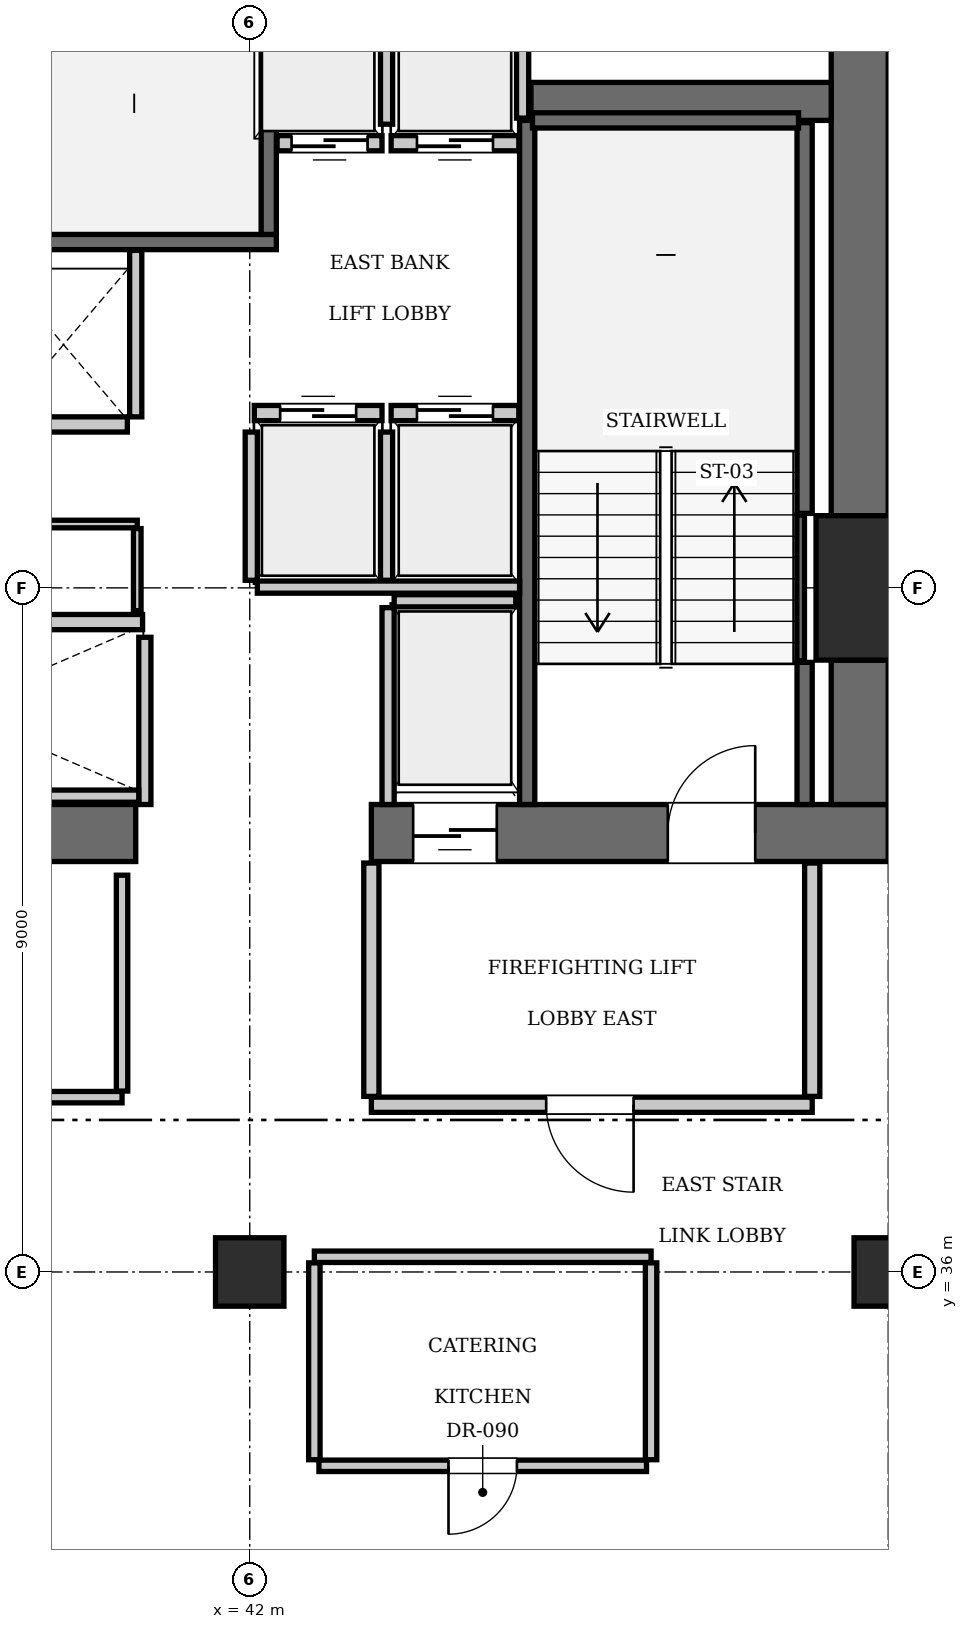
"""IFC4 building model, lengths in metres.
Left out: names, types, materials, properties, quantities, classifications, styles, units other than length and angle.
Written with IfcOpenShell. Run it as: python <this file> out.ifc"""

import sys

from ifc_helpers import new_model, si_unit, direction, frame, frame_2d, origin, origin_2d, place, context, subcontext, project, spatial, rectangle, extrude, element, fill, save


model = new_model("IFC4")
c1 = context("Model", 3, precision=1e-05, world=origin(), true_north=direction((0.0, 1.0)))
c2 = subcontext(c1, "Body", "Model", "MODEL_VIEW")
j1 = project(units=[si_unit("LENGTHUNIT", "METRE"), si_unit("PLANEANGLEUNIT", "RADIAN")], contexts=[c1])
p1 = place(None, origin())
s1 = spatial("IfcSite", under=j1, at=p1, CompositionType="ELEMENT")
p2 = place(p1, origin())
s2 = spatial("IfcBuilding", under=s1, at=p2, CompositionType="ELEMENT")
p3 = place(p2, frame((0.0, 0.0, 208.25)))
s3 = spatial("IfcBuildingStorey", under=s2, at=p3, CompositionType="ELEMENT", Elevation=208.25)
p4 = place(p3, frame((50.4, 45.0, 0.0), z_axis=(0.0, 0.0, 1.0), x_axis=(1.0, 0.0, 0.0)))
e1 = element("IfcColumn", 1, at=p4, inside=s3, PredefinedType="COLUMN", context=c2, shape_type="SweptSolid", body=[
    extrude(rectangle(XDim=1.9, YDim=1.9, at=origin_2d()), origin(), (0.0, 0.0, 1.0), 3.85),
])
p5 = place(p3, frame((35.1, 41.775, 0.0), z_axis=(0.0, 0.0, 1.0), x_axis=(1.0, 0.0, 0.0)))
e2 = element("IfcWall", 2, at=p5, inside=s3, PredefinedType="SHEAR", context=c2, shape_type="SweptSolid", body=[
    extrude(rectangle(XDim=5.4, YDim=0.75, at=frame_2d((2.7, 0.0))), origin(), (0.0, 0.0, 1.0), 3.85),
])
p6 = place(p3, frame((43.6, 41.775, 0.0), z_axis=(0.0, 0.0, 1.0), x_axis=(1.0, 0.0, 0.0)))
e3 = element("IfcWall", 3, at=p6, inside=s3, PredefinedType="SHEAR", context=c2, shape_type="SweptSolid", body=[
    extrude(rectangle(XDim=6.8, YDim=0.75, at=frame_2d((3.4, 0.0))), origin(), (0.0, 0.0, 1.0), 3.85),
])
p7 = place(p6, frame((3.9, 0.0, 0.0)))
e4 = element("IfcOpeningElement", 4, at=p7, cuts=e3, PredefinedType="OPENING", context=c2, shape_type="SweptSolid", body=[
    extrude(rectangle(XDim=1.15, YDim=2.15, at=frame_2d((0.575, 1.075))), frame((0.0, 0.385, 0.0), z_axis=(0.0, -1.0, 0.0), x_axis=(1.0, 0.0, 0.0)), (0.0, 0.0, 1.0), 0.77),
])
p8 = place(p6, frame((0.55, 0.0, 0.0)))
e5 = element("IfcOpeningElement", 5, at=p8, cuts=e3, PredefinedType="OPENING", context=c2, shape_type="SweptSolid", body=[
    extrude(rectangle(XDim=1.1, YDim=2.2, at=frame_2d((0.55, 1.1))), frame((0.0, 0.385, 0.0), z_axis=(0.0, -1.0, 0.0), x_axis=(1.0, 0.0, 0.0)), (0.0, 0.0, 1.0), 0.77),
])
p9 = place(p3, frame((50.025, 42.15, 0.0), z_axis=(0.0, 0.0, 1.0), x_axis=(0.0, 1.0, 0.0)))
e6 = element("IfcWall", 6, at=p9, inside=s3, PredefinedType="SHEAR", context=c2, shape_type="SweptSolid", body=[
    extrude(rectangle(XDim=1.9, YDim=0.75, at=frame_2d((0.95, 0.0))), origin(), (0.0, 0.0, 1.0), 3.85),
])
p10 = place(p3, frame((50.025, 45.95, 0.0), z_axis=(0.0, 0.0, 1.0), x_axis=(0.0, 1.0, 0.0)))
e7 = element("IfcWall", 7, at=p10, inside=s3, PredefinedType="SHEAR", context=c2, shape_type="SweptSolid", body=[
    extrude(rectangle(XDim=7.3, YDim=0.75, at=frame_2d((3.65, 0.0))), origin(), (0.0, 0.0, 1.0), 3.85),
])
p11 = place(p3, frame((45.7, 51.4, 0.0), z_axis=(0.0, 0.0, 1.0), x_axis=(1.0, 0.0, 0.0)))
e8 = element("IfcWall", 8, at=p11, inside=s3, PredefinedType="SHEAR", context=c2, shape_type="SweptSolid", body=[
    extrude(rectangle(XDim=3.95, YDim=0.5, at=frame_2d((1.975, 0.0))), origin(), (0.0, 0.0, 1.0), 3.85),
])
for number, where, z_axis, x_axis in (
    (9, (42.0, 36.0, 0.0), (0.0, 0.0, 1.0), (1.0, 0.0, 0.0)),
    (10, (50.4, 36.0, 0.0), (0.0, 0.0, 1.0), (1.0, 0.0, 0.0)),
):
    element("IfcColumn", number, at=place(p3, frame(where, z_axis=z_axis, x_axis=x_axis)), inside=s3, PredefinedType="COLUMN", context=c2, shape_type="SweptSolid", body=[
        extrude(rectangle(XDim=0.9, YDim=0.9, at=origin_2d()), origin(), (0.0, 0.0, 1.0), 3.85),
    ])
p12 = place(p3, frame((33.25, 49.55, 0.0), z_axis=(0.0, 0.0, 1.0), x_axis=(1.0, 0.0, 0.0)))
e11 = element("IfcWall", 11, at=p12, inside=s3, PredefinedType="SOLIDWALL", context=c2, shape_type="SweptSolid", body=[
    extrude(rectangle(XDim=9.1, YDim=0.2, at=frame_2d((4.55, 0.0))), origin(), (0.0, 0.0, 1.0), 3.61),
])
p13 = place(p3, frame((42.25, 49.65, 0.0), z_axis=(0.0, 0.0, 1.0), x_axis=(0.0, 1.0, 0.0)))
e12 = element("IfcWall", 12, at=p13, inside=s3, PredefinedType="SOLIDWALL", context=c2, shape_type="SweptSolid", body=[
    extrude(rectangle(XDim=3.6, YDim=0.2, at=frame_2d((1.8, 0.0))), origin(), (0.0, 0.0, 1.0), 3.61),
])
p14 = place(p3, frame((45.65, 42.15, 0.0), z_axis=(0.0, 0.0, 1.0), x_axis=(0.0, 1.0, 0.0)))
e13 = element("IfcWall", 13, at=p14, inside=s3, PredefinedType="SOLIDWALL", context=c2, shape_type="SweptSolid", body=[
    extrude(rectangle(XDim=9.0, YDim=0.2, at=frame_2d((4.5, 0.0))), origin(), (0.0, 0.0, 1.0), 3.61),
])
p15 = place(p3, frame((49.3, 42.15, 0.0), z_axis=(0.0, 0.0, 1.0), x_axis=(0.0, 1.0, 0.0)))
e14 = element("IfcWall", 14, at=p15, inside=s3, PredefinedType="SOLIDWALL", context=c2, shape_type="SweptSolid", body=[
    extrude(rectangle(XDim=1.87, YDim=0.2, at=frame_2d((0.935, 0.0))), origin(), (0.0, 0.0, 1.0), 3.61),
])
p16 = place(p3, frame((49.3, 45.98, 0.0), z_axis=(0.0, 0.0, 1.0), x_axis=(0.0, 1.0, 0.0)))
e15 = element("IfcWall", 15, at=p16, inside=s3, PredefinedType="SOLIDWALL", context=c2, shape_type="SweptSolid", body=[
    extrude(rectangle(XDim=5.14, YDim=0.2, at=frame_2d((2.57, 0.0))), origin(), (0.0, 0.0, 1.0), 3.61),
])
p17 = place(p3, frame((45.72, 51.15, 0.0), z_axis=(0.0, 0.0, 1.0), x_axis=(1.0, 0.0, 0.0)))
e16 = element("IfcWall", 16, at=p17, inside=s3, PredefinedType="SOLIDWALL", context=c2, shape_type="SweptSolid", body=[
    extrude(rectangle(XDim=3.5, YDim=0.2, at=frame_2d((1.75, 0.0))), origin(), (0.0, 0.0, 1.0), 3.61),
])
p18 = place(p3, frame((49.248, 44.04, 0.0), z_axis=(0.0, 0.0, 1.0), x_axis=(0.0, 1.0, 0.0)))
e17 = element("IfcWall", 17, at=p18, inside=s3, PredefinedType="SOLIDWALL", context=c2, shape_type="SweptSolid", body=[
    extrude(rectangle(XDim=1.92, YDim=0.1, at=frame_2d((0.96, 0.0))), origin(), (0.0, 0.0, 1.0), 3.61),
])
p19 = place(p3, frame((42.06, 47.3, 0.0), z_axis=(0.0, 0.0, 1.0), x_axis=(1.0, 0.0, 0.0)))
e18 = element("IfcWall", 18, at=p19, inside=s3, PredefinedType="SOLIDWALL", context=c2, shape_type="SweptSolid", body=[
    extrude(rectangle(XDim=1.68, YDim=0.2, at=frame_2d((0.84, 0.0))), origin(), (0.0, 0.0, 1.0), 3.61),
])
p20 = place(p19, frame((0.34, 0.0, 0.0)))
e19 = element("IfcOpeningElement", 19, at=p20, cuts=e18, PredefinedType="OPENING", context=c2, shape_type="SweptSolid", body=[
    extrude(rectangle(XDim=1.0, YDim=2.15, at=frame_2d((0.5, 1.075))), frame((0.0, 0.11, 0.0), z_axis=(0.0, -1.0, 0.0), x_axis=(1.0, 0.0, 0.0)), (0.0, 0.0, 1.0), 0.22),
])
p21 = place(p3, frame((43.86, 47.3, 0.0), z_axis=(0.0, 0.0, 1.0), x_axis=(1.0, 0.0, 0.0)))
e20 = element("IfcWall", 20, at=p21, inside=s3, PredefinedType="SOLIDWALL", context=c2, shape_type="SweptSolid", body=[
    extrude(rectangle(XDim=1.68, YDim=0.2, at=frame_2d((0.84, 0.0))), origin(), (0.0, 0.0, 1.0), 3.61),
])
p22 = place(p21, frame((0.34, 0.0, 0.0)))
e21 = element("IfcOpeningElement", 21, at=p22, cuts=e20, PredefinedType="OPENING", context=c2, shape_type="SweptSolid", body=[
    extrude(rectangle(XDim=1.0, YDim=2.15, at=frame_2d((0.5, 1.075))), frame((0.0, 0.11, 0.0), z_axis=(0.0, -1.0, 0.0), x_axis=(1.0, 0.0, 0.0)), (0.0, 0.0, 1.0), 0.22),
])
p23 = place(p3, frame((42.36, 50.85, 0.0), z_axis=(0.0, 0.0, 1.0), x_axis=(1.0, 0.0, 0.0)))
e22 = element("IfcWall", 22, at=p23, inside=s3, PredefinedType="SOLIDWALL", context=c2, shape_type="SweptSolid", body=[
    extrude(rectangle(XDim=1.38, YDim=0.2, at=frame_2d((0.69, 0.0))), origin(), (0.0, 0.0, 1.0), 3.61),
])
p24 = place(p23, frame((0.19, 0.0, 0.0)))
e23 = element("IfcOpeningElement", 23, at=p24, cuts=e22, PredefinedType="OPENING", context=c2, shape_type="SweptSolid", body=[
    extrude(rectangle(XDim=1.0, YDim=2.15, at=frame_2d((0.5, 1.075))), frame((0.0, 0.11, 0.0), z_axis=(0.0, -1.0, 0.0), x_axis=(1.0, 0.0, 0.0)), (0.0, 0.0, 1.0), 0.22),
])
p25 = place(p3, frame((43.86, 50.85, 0.0), z_axis=(0.0, 0.0, 1.0), x_axis=(1.0, 0.0, 0.0)))
e24 = element("IfcWall", 24, at=p25, inside=s3, PredefinedType="SOLIDWALL", context=c2, shape_type="SweptSolid", body=[
    extrude(rectangle(XDim=1.68, YDim=0.2, at=frame_2d((0.84, 0.0))), origin(), (0.0, 0.0, 1.0), 3.61),
])
p26 = place(p25, frame((0.34, 0.0, 0.0)))
e25 = element("IfcOpeningElement", 25, at=p26, cuts=e24, PredefinedType="OPENING", context=c2, shape_type="SweptSolid", body=[
    extrude(rectangle(XDim=1.0, YDim=2.15, at=frame_2d((0.5, 1.075))), frame((0.0, 0.11, 0.0), z_axis=(0.0, -1.0, 0.0), x_axis=(1.0, 0.0, 0.0)), (0.0, 0.0, 1.0), 0.22),
])
p27 = place(p3, frame((38.91, 44.55, 0.0), z_axis=(0.0, 0.0, 1.0), x_axis=(1.0, 0.0, 0.0)))
e26 = element("IfcWall", 26, at=p27, inside=s3, PredefinedType="SOLIDWALL", context=c2, shape_type="SweptSolid", body=[
    extrude(rectangle(XDim=1.68, YDim=0.2, at=frame_2d((0.84, 0.0))), origin(), (0.0, 0.0, 1.0), 3.61),
])
p28 = place(p3, frame((38.71, 47.15, 0.0), z_axis=(0.0, 0.0, 1.0), x_axis=(1.0, 0.0, 0.0)))
e27 = element("IfcWall", 27, at=p28, inside=s3, PredefinedType="SOLIDWALL", context=c2, shape_type="SweptSolid", body=[
    extrude(rectangle(XDim=1.68, YDim=0.2, at=frame_2d((0.84, 0.0))), origin(), (0.0, 0.0, 1.0), 3.61),
])
p29 = place(p3, frame((43.9, 44.83, 0.0), z_axis=(0.0, 0.0, 1.0), x_axis=(1.0, 0.0, 0.0)))
e28 = element("IfcWall", 28, at=p29, inside=s3, PredefinedType="SOLIDWALL", context=c2, shape_type="SweptSolid", body=[
    extrude(rectangle(XDim=1.6, YDim=0.16, at=frame_2d((0.8, 0.0))), origin(), (0.0, 0.0, 1.0), 3.61),
])
p30 = place(p3, frame((43.82, 42.15, 0.0), z_axis=(0.0, 0.0, 1.0), x_axis=(0.0, 1.0, 0.0)))
e29 = element("IfcWall", 29, at=p30, inside=s3, PredefinedType="SOLIDWALL", context=c2, shape_type="SweptSolid", body=[
    extrude(rectangle(XDim=2.59, YDim=0.16, at=frame_2d((1.295, 0.0))), origin(), (0.0, 0.0, 1.0), 3.61),
])
for number, where, z_axis, x_axis in (
    (30, (42.02, 45.1, 0.0), (0.0, 0.0, 1.0), (0.0, 1.0, 0.0)),
    (31, (43.8, 45.1, 0.0), (0.0, 0.0, 1.0), (0.0, 1.0, 0.0)),
):
    element("IfcWall", number, at=place(p3, frame(where, z_axis=z_axis, x_axis=x_axis)), inside=s3, PredefinedType="SOLIDWALL", context=c2, shape_type="SweptSolid", body=[
        extrude(rectangle(XDim=1.95, YDim=0.16, at=frame_2d((0.975, 0.0))), origin(), (0.0, 0.0, 1.0), 3.61),
    ])
p31 = place(p3, frame((42.1, 45.01, 0.0), z_axis=(0.0, 0.0, 1.0), x_axis=(1.0, 0.0, 0.0)))
e32 = element("IfcWall", 32, at=p31, inside=s3, PredefinedType="SOLIDWALL", context=c2, shape_type="SweptSolid", body=[
    extrude(rectangle(XDim=3.45, YDim=0.16, at=frame_2d((1.725, 0.0))), origin(), (0.0, 0.0, 1.0), 3.61),
])
p32 = place(p3, frame((45.59, 51.18, 0.0), z_axis=(0.0, 0.0, 1.0), x_axis=(0.0, 1.0, 0.0)))
e33 = element("IfcWall", 33, at=p32, inside=s3, PredefinedType="SOLIDWALL", context=c2, shape_type="SweptSolid", body=[
    extrude(rectangle(XDim=2.07, YDim=0.16, at=frame_2d((1.035, 0.0))), origin(), (0.0, 0.0, 1.0), 3.61),
])
p33 = place(p3, frame((43.8, 51.1, 0.0), z_axis=(0.0, 0.0, 1.0), x_axis=(0.0, 1.0, 0.0)))
e34 = element("IfcWall", 34, at=p33, inside=s3, PredefinedType="SOLIDWALL", context=c2, shape_type="SweptSolid", body=[
    extrude(rectangle(XDim=2.15, YDim=0.16, at=frame_2d((1.075, 0.0))), origin(), (0.0, 0.0, 1.0), 3.61),
])
p34 = place(p3, frame((40.62, 42.15, 0.0), z_axis=(0.0, 0.0, 1.0), x_axis=(0.0, 1.0, 0.0)))
e35 = element("IfcWall", 35, at=p34, inside=s3, PredefinedType="SOLIDWALL", context=c2, shape_type="SweptSolid", body=[
    extrude(rectangle(XDim=2.2, YDim=0.16, at=frame_2d((1.1, 0.0))), origin(), (0.0, 0.0, 1.0), 3.61),
])
p35 = place(p3, frame((35.52, 42.26, 0.0), z_axis=(0.0, 0.0, 1.0), x_axis=(1.0, 0.0, 0.0)))
e36 = element("IfcWall", 36, at=p35, inside=s3, PredefinedType="SOLIDWALL", context=c2, shape_type="SweptSolid", body=[
    extrude(rectangle(XDim=5.02, YDim=0.16, at=frame_2d((2.51, 0.0))), origin(), (0.0, 0.0, 1.0), 3.61),
])
p36 = place(p3, frame((40.5, 47.25, 0.0), z_axis=(0.0, 0.0, 1.0), x_axis=(0.0, 1.0, 0.0)))
e37 = element("IfcWall", 37, at=p36, inside=s3, PredefinedType="SOLIDWALL", context=c2, shape_type="SweptSolid", body=[
    extrude(rectangle(XDim=2.19, YDim=0.16, at=frame_2d((1.095, 0.0))), origin(), (0.0, 0.0, 1.0), 3.61),
])
p37 = place(p3, frame((43.6, 38.2, 0.0), z_axis=(0.0, 0.0, 1.0), x_axis=(1.0, 0.0, 0.0)))
e38 = element("IfcWall", 38, at=p37, inside=s3, PredefinedType="PARTITIONING", context=c2, shape_type="SweptSolid", body=[
    extrude(rectangle(XDim=5.8, YDim=0.2, at=frame_2d((2.9, 0.0))), origin(), (0.0, 0.0, 1.0), 3.61),
])
p38 = place(p37, frame((2.3, 0.0, 0.0)))
e39 = element("IfcOpeningElement", 39, at=p38, cuts=e38, PredefinedType="OPENING", context=c2, shape_type="SweptSolid", body=[
    extrude(rectangle(XDim=1.15, YDim=2.15, at=frame_2d((0.575, 1.075))), frame((0.0, 0.11, 0.0), z_axis=(0.0, -1.0, 0.0), x_axis=(1.0, 0.0, 0.0)), (0.0, 0.0, 1.0), 0.22),
])
for number, where, z_axis, x_axis in (
    (40, (43.6, 38.31, 0.0), (0.0, 0.0, 1.0), (0.0, 1.0, 0.0)),
    (41, (49.4, 38.31, 0.0), (0.0, 0.0, 1.0), (0.0, 1.0, 0.0)),
):
    element("IfcWall", number, at=place(p3, frame(where, z_axis=z_axis, x_axis=x_axis)), inside=s3, PredefinedType="PARTITIONING", context=c2, shape_type="SweptSolid", body=[
        extrude(rectangle(XDim=3.07, YDim=0.2, at=frame_2d((1.535, 0.0))), origin(), (0.0, 0.0, 1.0), 3.61),
    ])
p39 = place(p3, frame((35.58, 45.84, 0.0), z_axis=(0.0, 0.0, 1.0), x_axis=(1.0, 0.0, 0.0)))
e42 = element("IfcWall", 42, at=p39, inside=s3, PredefinedType="PARTITIONING", context=c2, shape_type="SweptSolid", body=[
    extrude(rectangle(XDim=4.94, YDim=0.1, at=frame_2d((2.47, 0.0))), origin(), (0.0, 0.0, 1.0), 3.61),
])
p40 = place(p39, frame((1.8, 0.0, 0.0)))
e43 = element("IfcOpeningElement", 43, at=p40, cuts=e42, PredefinedType="OPENING", context=c2, shape_type="SweptSolid", body=[
    extrude(rectangle(XDim=0.8, YDim=2.05, at=frame_2d((0.4, 1.025))), frame((0.0, 0.06, 0.0), z_axis=(0.0, -1.0, 0.0), x_axis=(1.0, 0.0, 0.0)), (0.0, 0.0, 1.0), 0.12),
])
p41 = place(p3, frame((40.52, 44.7, 0.0), z_axis=(0.0, 0.0, 1.0), x_axis=(0.0, 1.0, 0.0)))
e44 = element("IfcWall", 44, at=p41, inside=s3, PredefinedType="PARTITIONING", context=c2, shape_type="SweptSolid", body=[
    extrude(rectangle(XDim=1.08, YDim=0.1, at=frame_2d((0.54, 0.0))), origin(), (0.0, 0.0, 1.0), 3.61),
])
p42 = place(p3, frame((34.4, 38.3, 0.0), z_axis=(0.0, 0.0, 1.0), x_axis=(1.0, 0.0, 0.0)))
e45 = element("IfcWall", 45, at=p42, inside=s3, PredefinedType="PARTITIONING", context=c2, shape_type="SweptSolid", body=[
    extrude(rectangle(XDim=5.92, YDim=0.15, at=frame_2d((2.96, 0.0))), origin(), (0.0, 0.0, 1.0), 3.61),
])
p43 = place(p42, frame((2.4, 0.0, 0.0)))
e46 = element("IfcOpeningElement", 46, at=p43, cuts=e45, PredefinedType="OPENING", context=c2, shape_type="SweptSolid", body=[
    extrude(rectangle(XDim=0.9, YDim=2.1, at=frame_2d((0.45, 1.05))), frame((0.0, 0.085, 0.0), z_axis=(0.0, -1.0, 0.0), x_axis=(1.0, 0.0, 0.0)), (0.0, 0.0, 1.0), 0.17),
])
p44 = place(p3, frame((40.32, 38.38, 0.0), z_axis=(0.0, 0.0, 1.0), x_axis=(0.0, 1.0, 0.0)))
e47 = element("IfcWall", 47, at=p44, inside=s3, PredefinedType="PARTITIONING", context=c2, shape_type="SweptSolid", body=[
    extrude(rectangle(XDim=2.84, YDim=0.15, at=frame_2d((1.42, 0.0))), origin(), (0.0, 0.0, 1.0), 3.61),
])
p45 = place(p3, frame((42.85, 36.2, 0.0), z_axis=(0.0, 0.0, 1.0), x_axis=(1.0, 0.0, 0.0)))
e48 = element("IfcWall", 48, at=p45, inside=s3, PredefinedType="PARTITIONING", context=c2, shape_type="SweptSolid", body=[
    extrude(rectangle(XDim=4.43, YDim=0.15, at=frame_2d((2.215, 0.0))), origin(), (0.0, 0.0, 1.0), 3.61),
])
for number, where, z_axis, x_axis in (
    (49, (42.85, 33.53, 0.0), (0.0, 0.0, 1.0), (0.0, 1.0, 0.0)),
    (50, (47.28, 33.53, 0.0), (0.0, 0.0, 1.0), (0.0, 1.0, 0.0)),
):
    element("IfcWall", number, at=place(p3, frame(where, z_axis=z_axis, x_axis=x_axis)), inside=s3, PredefinedType="PARTITIONING", context=c2, shape_type="SweptSolid", body=[
        extrude(rectangle(XDim=2.59, YDim=0.15, at=frame_2d((1.295, 0.0))), origin(), (0.0, 0.0, 1.0), 3.61),
    ])
p46 = place(p3, frame((42.91, 33.45, 0.0), z_axis=(0.0, 0.0, 1.0), x_axis=(1.0, 0.0, 0.0)))
e51 = element("IfcWall", 51, at=p46, inside=s3, PredefinedType="PARTITIONING", context=c2, shape_type="SweptSolid", body=[
    extrude(rectangle(XDim=4.31, YDim=0.15, at=frame_2d((2.155, 0.0))), origin(), (0.0, 0.0, 1.0), 3.61),
])
p47 = place(p46, frame((1.705, 0.0, 0.0)))
e52 = element("IfcOpeningElement", 52, at=p47, cuts=e51, PredefinedType="OPENING", context=c2, shape_type="SweptSolid", body=[
    extrude(rectangle(XDim=0.9, YDim=2.1, at=frame_2d((0.45, 1.05))), frame((0.0, 0.085, 0.0), z_axis=(0.0, -1.0, 0.0), x_axis=(1.0, 0.0, 0.0)), (0.0, 0.0, 1.0), 0.17),
])
p48 = place(p7, origin())
e53 = element("IfcDoor", 53, at=p48, inside=s3, OperationType="SINGLE_SWING_RIGHT", PredefinedType="DOOR", context=c2, shape_type="SweptSolid", body=[
    extrude(rectangle(XDim=1.15, YDim=2.15, at=frame_2d((0.575, 1.075))), frame((0.0, 0.025, 0.0), z_axis=(0.0, -1.0, 0.0), x_axis=(1.0, 0.0, 0.0)), (0.0, 0.0, 1.0), 0.05),
])
fill(e4, e53)
p49 = place(p20, origin())
e54 = element("IfcDoor", 54, at=p49, inside=s3, OperationType="SLIDING_TO_LEFT", PredefinedType="DOOR", context=c2, shape_type="SweptSolid", body=[
    extrude(rectangle(XDim=1.0, YDim=2.15, at=frame_2d((0.5, 1.075))), frame((0.0, 0.025, 0.0), z_axis=(0.0, -1.0, 0.0), x_axis=(1.0, 0.0, 0.0)), (0.0, 0.0, 1.0), 0.05),
])
fill(e19, e54)
p50 = place(p22, origin())
e55 = element("IfcDoor", 55, at=p50, inside=s3, OperationType="SLIDING_TO_LEFT", PredefinedType="DOOR", context=c2, shape_type="SweptSolid", body=[
    extrude(rectangle(XDim=1.0, YDim=2.15, at=frame_2d((0.5, 1.075))), frame((0.0, 0.025, 0.0), z_axis=(0.0, -1.0, 0.0), x_axis=(1.0, 0.0, 0.0)), (0.0, 0.0, 1.0), 0.05),
])
fill(e21, e55)
p51 = place(p24, frame((1.0, 0.0, 0.0), z_axis=(0.0, 0.0, 1.0), x_axis=(-1.0, 0.0, 0.0)))
e56 = element("IfcDoor", 56, at=p51, inside=s3, OperationType="SLIDING_TO_LEFT", PredefinedType="DOOR", context=c2, shape_type="SweptSolid", body=[
    extrude(rectangle(XDim=1.0, YDim=2.15, at=frame_2d((0.5, 1.075))), frame((0.0, 0.025, 0.0), z_axis=(0.0, -1.0, 0.0), x_axis=(1.0, 0.0, 0.0)), (0.0, 0.0, 1.0), 0.05),
])
fill(e23, e56)
p52 = place(p26, frame((1.0, 0.0, 0.0), z_axis=(0.0, 0.0, 1.0), x_axis=(-1.0, 0.0, 0.0)))
e57 = element("IfcDoor", 57, at=p52, inside=s3, OperationType="SLIDING_TO_LEFT", PredefinedType="DOOR", context=c2, shape_type="SweptSolid", body=[
    extrude(rectangle(XDim=1.0, YDim=2.15, at=frame_2d((0.5, 1.075))), frame((0.0, 0.025, 0.0), z_axis=(0.0, -1.0, 0.0), x_axis=(1.0, 0.0, 0.0)), (0.0, 0.0, 1.0), 0.05),
])
fill(e25, e57)
p53 = place(p8, frame((1.1, 0.0, 0.0), z_axis=(0.0, 0.0, 1.0), x_axis=(-1.0, 0.0, 0.0)))
e58 = element("IfcDoor", 58, at=p53, inside=s3, OperationType="SLIDING_TO_LEFT", PredefinedType="DOOR", context=c2, shape_type="SweptSolid", body=[
    extrude(rectangle(XDim=1.1, YDim=2.2, at=frame_2d((0.55, 1.1))), frame((0.0, 0.025, 0.0), z_axis=(0.0, -1.0, 0.0), x_axis=(1.0, 0.0, 0.0)), (0.0, 0.0, 1.0), 0.05),
])
fill(e5, e58)
p54 = place(p38, frame((1.15, 0.0, 0.0), z_axis=(0.0, 0.0, 1.0), x_axis=(-1.0, 0.0, 0.0)))
e59 = element("IfcDoor", 59, at=p54, inside=s3, OperationType="SINGLE_SWING_LEFT", PredefinedType="DOOR", context=c2, shape_type="SweptSolid", body=[
    extrude(rectangle(XDim=1.15, YDim=2.15, at=frame_2d((0.575, 1.075))), frame((0.0, 0.025, 0.0), z_axis=(0.0, -1.0, 0.0), x_axis=(1.0, 0.0, 0.0)), (0.0, 0.0, 1.0), 0.05),
])
fill(e39, e59)
p55 = place(p47, frame((0.9, 0.0, 0.0), z_axis=(0.0, 0.0, 1.0), x_axis=(-1.0, 0.0, 0.0)))
e60 = element("IfcDoor", 60, at=p55, inside=s3, OperationType="SINGLE_SWING_RIGHT", PredefinedType="DOOR", context=c2, shape_type="SweptSolid", body=[
    extrude(rectangle(XDim=0.9, YDim=2.1, at=frame_2d((0.45, 1.05))), frame((0.0, 0.025, 0.0), z_axis=(0.0, -1.0, 0.0), x_axis=(1.0, 0.0, 0.0)), (0.0, 0.0, 1.0), 0.05),
])
fill(e52, e60)
save(model, sys.argv[1])
